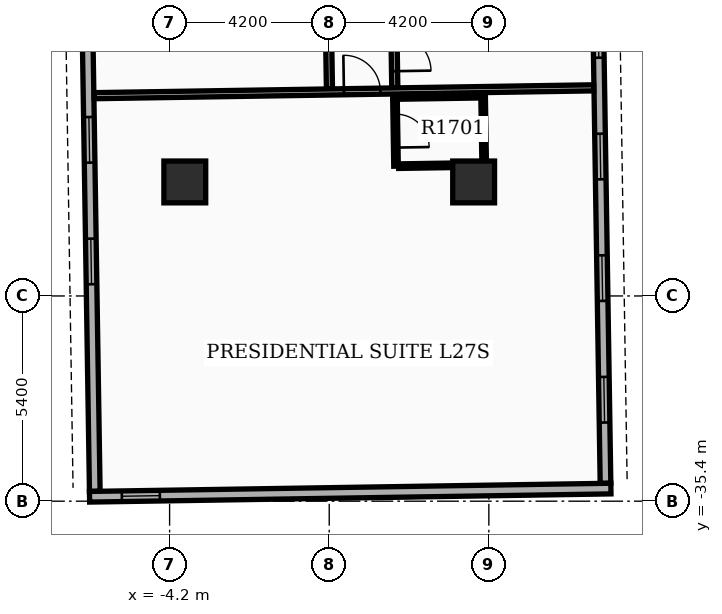
"""IFC4 building model, lengths in metres.
Left out: names, types, materials, properties, quantities, classifications, styles, units other than length and angle.
Written with IfcOpenShell. Run it as: python <this file> out.ifc"""

import sys

from ifc_helpers import new_model, si_unit, direction, frame, frame_2d, origin, origin_2d, place, context, subcontext, project, spatial, rectangle, extrude, element, fill, save


model = new_model("IFC4")
c1 = context("Model", 3, precision=1e-05, world=origin(), true_north=direction((0.0, 1.0)))
c2 = subcontext(c1, "Body", "Model", "MODEL_VIEW")
j1 = project(units=[si_unit("LENGTHUNIT", "METRE"), si_unit("PLANEANGLEUNIT", "RADIAN")], contexts=[c1])
p1 = place(None, origin())
s1 = spatial("IfcSite", under=j1, at=p1, CompositionType="ELEMENT")
p2 = place(p1, origin())
s2 = spatial("IfcBuilding", under=s1, at=p2, CompositionType="ELEMENT")
p3 = place(p2, frame((0.0, 0.0, 108.6)))
s3 = spatial("IfcBuildingStorey", under=s2, at=p3, CompositionType="ELEMENT", Elevation=108.6)
for number, where, z_axis, x_axis in (
    (1, (-3.8, -27.0, 0.0), (0.0, 0.0, 1.0), (1.0, 0.0, 0.0)),
    (2, (3.8, -27.0, 0.0), (0.0, 0.0, 1.0), (1.0, 0.0, 0.0)),
):
    element("IfcColumn", number, at=place(p3, frame(where, z_axis=z_axis, x_axis=x_axis)), inside=s3, PredefinedType="COLUMN", context=c2, shape_type="SweptSolid", body=[
        extrude(rectangle(XDim=1.1, YDim=1.1, at=origin_2d()), origin(), (0.0, 0.0, 1.0), 3.9),
    ])
p4 = place(p3, frame((-6.485, -15.044, 0.0), z_axis=(0.0, 0.0, 1.0), x_axis=(0.01571739401, -0.999876474133, 0.0)))
e3 = element("IfcWall", 3, at=p4, inside=s3, PredefinedType="STANDARD", context=c2, shape_type="SweptSolid", body=[
    extrude(rectangle(XDim=20.1, YDim=0.28, at=frame_2d((10.05, 0.0))), origin(), (0.0, 0.0, 1.0), 2.97),
])
p5 = place(p4, frame((1.6, 0.0, 0.8)))
e4 = element("IfcOpeningElement", 4, at=p5, cuts=e3, PredefinedType="OPENING", context=c2, shape_type="SweptSolid", body=[
    extrude(rectangle(XDim=1.2, YDim=1.6, at=frame_2d((0.6, 0.8))), frame((0.0, 0.15, 0.0), z_axis=(0.0, -1.0, 0.0), x_axis=(1.0, 0.0, 0.0)), (0.0, 0.0, 1.0), 0.3),
])
p6 = place(p4, frame((4.8, 0.0, 0.8)))
e5 = element("IfcOpeningElement", 5, at=p6, cuts=e3, PredefinedType="OPENING", context=c2, shape_type="SweptSolid", body=[
    extrude(rectangle(XDim=1.2, YDim=1.6, at=frame_2d((0.6, 0.8))), frame((0.0, 0.15, 0.0), z_axis=(0.0, -1.0, 0.0), x_axis=(1.0, 0.0, 0.0)), (0.0, 0.0, 1.0), 0.3),
])
p7 = place(p4, frame((10.25, 0.0, 0.8)))
e6 = element("IfcOpeningElement", 6, at=p7, cuts=e3, PredefinedType="OPENING", context=c2, shape_type="SweptSolid", body=[
    extrude(rectangle(XDim=1.2, YDim=1.6, at=frame_2d((0.6, 0.8))), frame((0.0, 0.15, 0.0), z_axis=(0.0, -1.0, 0.0), x_axis=(1.0, 0.0, 0.0)), (0.0, 0.0, 1.0), 0.3),
])
p8 = place(p4, frame((13.45, 0.0, 0.8)))
e7 = element("IfcOpeningElement", 7, at=p8, cuts=e3, PredefinedType="OPENING", context=c2, shape_type="SweptSolid", body=[
    extrude(rectangle(XDim=1.2, YDim=1.6, at=frame_2d((0.6, 0.8))), frame((0.0, 0.15, 0.0), z_axis=(0.0, -1.0, 0.0), x_axis=(1.0, 0.0, 0.0)), (0.0, 0.0, 1.0), 0.3),
])
p9 = place(p3, frame((7.27, -34.93, 0.0), z_axis=(0.0, 0.0, 1.0), x_axis=(-0.015705059908, 0.999876667941, 0.0)))
e8 = element("IfcWall", 8, at=p9, inside=s3, PredefinedType="STANDARD", context=c2, shape_type="SweptSolid", body=[
    extrude(rectangle(XDim=20.1, YDim=0.28, at=frame_2d((10.05, 0.0))), origin(), (0.0, 0.0, 1.0), 2.97),
])
p10 = place(p9, frame((1.6, 0.0, 0.8)))
e9 = element("IfcOpeningElement", 9, at=p10, cuts=e8, PredefinedType="OPENING", context=c2, shape_type="SweptSolid", body=[
    extrude(rectangle(XDim=1.2, YDim=1.6, at=frame_2d((0.6, 0.8))), frame((0.0, 0.15, 0.0), z_axis=(0.0, -1.0, 0.0), x_axis=(1.0, 0.0, 0.0)), (0.0, 0.0, 1.0), 0.3),
])
p11 = place(p9, frame((4.8, 0.0, 0.8)))
e10 = element("IfcOpeningElement", 10, at=p11, cuts=e8, PredefinedType="OPENING", context=c2, shape_type="SweptSolid", body=[
    extrude(rectangle(XDim=1.2, YDim=1.6, at=frame_2d((0.6, 0.8))), frame((0.0, 0.15, 0.0), z_axis=(0.0, -1.0, 0.0), x_axis=(1.0, 0.0, 0.0)), (0.0, 0.0, 1.0), 0.3),
])
p12 = place(p9, frame((8.0, 0.0, 0.8)))
e11 = element("IfcOpeningElement", 11, at=p12, cuts=e8, PredefinedType="OPENING", context=c2, shape_type="SweptSolid", body=[
    extrude(rectangle(XDim=1.2, YDim=1.6, at=frame_2d((0.6, 0.8))), frame((0.0, 0.15, 0.0), z_axis=(0.0, -1.0, 0.0), x_axis=(1.0, 0.0, 0.0)), (0.0, 0.0, 1.0), 0.3),
])
p13 = place(p9, frame((11.2, 0.0, 0.8)))
e12 = element("IfcOpeningElement", 12, at=p13, cuts=e8, PredefinedType="OPENING", context=c2, shape_type="SweptSolid", body=[
    extrude(rectangle(XDim=1.2, YDim=1.6, at=frame_2d((0.6, 0.8))), frame((0.0, 0.15, 0.0), z_axis=(0.0, -1.0, 0.0), x_axis=(1.0, 0.0, 0.0)), (0.0, 0.0, 1.0), 0.3),
])
p14 = place(p3, frame((-6.307, -35.283, 0.0), z_axis=(0.0, 0.0, 1.0), x_axis=(0.999876549481, 0.015712599986, 0.0)))
e13 = element("IfcWall", 13, at=p14, inside=s3, PredefinedType="STANDARD", context=c2, shape_type="SweptSolid", body=[
    extrude(rectangle(XDim=13.72, YDim=0.28, at=frame_2d((6.86, 0.0))), origin(), (0.0, 0.0, 1.0), 2.97),
])
p15 = place(p14, frame((0.85, 0.0, 0.85)))
e14 = element("IfcOpeningElement", 14, at=p15, cuts=e13, PredefinedType="OPENING", context=c2, shape_type="SweptSolid", body=[
    extrude(rectangle(XDim=1.0, YDim=1.5, at=frame_2d((0.5, 0.75))), frame((0.0, 0.15, 0.0), z_axis=(0.0, -1.0, 0.0), x_axis=(1.0, 0.0, 0.0)), (0.0, 0.0, 1.0), 0.3),
])
p16 = place(p3, frame((1.573, -14.827, 0.0), z_axis=(0.0, 0.0, 1.0), x_axis=(0.015705659641, -0.999876658521, 0.0)))
e15 = element("IfcWall", 15, at=p16, inside=s3, PredefinedType="PARTITIONING", context=c2, shape_type="SweptSolid", body=[
    extrude(rectangle(XDim=9.7, YDim=0.16, at=frame_2d((4.85, 0.0))), origin(), (0.0, 0.0, 1.0), 2.96),
])
p17 = place(p16, frame((8.3, 0.0, 0.0)))
e16 = element("IfcOpeningElement", 16, at=p17, cuts=e15, PredefinedType="OPENING", context=c2, shape_type="SweptSolid", body=[
    extrude(rectangle(XDim=0.96, YDim=2.15, at=frame_2d((0.48, 1.075))), frame((0.0, 0.09, 0.0), z_axis=(0.0, -1.0, 0.0), x_axis=(1.0, 0.0, 0.0)), (0.0, 0.0, 1.0), 0.18),
])
p18 = place(p3, frame((-0.147, -14.854, 0.0), z_axis=(0.0, 0.0, 1.0), x_axis=(0.015705264399, -0.999876664729, 0.0)))
e17 = element("IfcWall", 17, at=p18, inside=s3, PredefinedType="PARTITIONING", context=c2, shape_type="SweptSolid", body=[
    extrude(rectangle(XDim=9.7, YDim=0.16, at=frame_2d((4.85, 0.0))), origin(), (0.0, 0.0, 1.0), 2.96),
])
p19 = place(p18, frame((7.704, 0.0, 0.0)))
e18 = element("IfcOpeningElement", 18, at=p19, cuts=e17, PredefinedType="OPENING", context=c2, shape_type="SweptSolid", body=[
    extrude(rectangle(XDim=0.96, YDim=2.15, at=frame_2d((0.48, 1.075))), frame((0.0, 0.09, 0.0), z_axis=(0.0, -1.0, 0.0), x_axis=(1.0, 0.0, 0.0)), (0.0, 0.0, 1.0), 0.18),
])
p20 = place(p3, frame((-6.184, -24.73, 0.0), z_axis=(0.0, 0.0, 1.0), x_axis=(0.999876528878, 0.015713911007, 0.0)))
e19 = element("IfcWall", 19, at=p20, inside=s3, PredefinedType="PARTITIONING", context=c2, shape_type="SweptSolid", body=[
    extrude(rectangle(XDim=13.144, YDim=0.16, at=frame_2d((6.572, 0.0))), origin(), (0.0, 0.0, 1.0), 2.96),
])
p21 = place(p20, frame((6.572, 0.0, 0.0)))
e20 = element("IfcOpeningElement", 20, at=p21, cuts=e19, PredefinedType="OPENING", context=c2, shape_type="SweptSolid", body=[
    extrude(rectangle(XDim=0.96, YDim=2.15, at=frame_2d((0.48, 1.075))), frame((0.0, 0.09, 0.0), z_axis=(0.0, -1.0, 0.0), x_axis=(1.0, 0.0, 0.0)), (0.0, 0.0, 1.0), 0.18),
])
p22 = place(p3, frame((1.729, -24.766, 0.0), z_axis=(0.0, 0.0, 1.0), x_axis=(0.015694337248, -0.999876836305, 0.0)))
e21 = element("IfcWall", 21, at=p22, inside=s3, PredefinedType="PARTITIONING", context=c2, shape_type="SweptSolid", body=[
    extrude(rectangle(XDim=1.82, YDim=0.12, at=frame_2d((0.91, 0.0))), origin(), (0.0, 0.0, 1.0), 2.96),
])
p23 = place(p22, frame((0.45, 0.0, 0.0)))
e22 = element("IfcOpeningElement", 22, at=p23, cuts=e21, PredefinedType="OPENING", context=c2, shape_type="SweptSolid", body=[
    extrude(rectangle(XDim=0.88, YDim=2.1, at=frame_2d((0.44, 1.05))), frame((0.0, 0.07, 0.0), z_axis=(0.0, -1.0, 0.0), x_axis=(1.0, 0.0, 0.0)), (0.0, 0.0, 1.0), 0.14),
])
p24 = place(p3, frame((4.049, -24.729, 0.0), z_axis=(0.0, 0.0, 1.0), x_axis=(0.015694337248, -0.999876836305, 0.0)))
e23 = element("IfcWall", 23, at=p24, inside=s3, PredefinedType="PARTITIONING", context=c2, shape_type="SweptSolid", body=[
    extrude(rectangle(XDim=1.82, YDim=0.12, at=frame_2d((0.91, 0.0))), origin(), (0.0, 0.0, 1.0), 2.96),
])
for number, where, z_axis, x_axis in (
    (24, (1.799, -24.765, 0.0), (0.0, 0.0, 1.0), (1.0, 0.016, 0.0)),
    (25, (1.828, -26.585, 0.0), (0.0, 0.0, 1.0), (1.0, 0.016, 0.0)),
):
    element("IfcWall", number, at=place(p3, frame(where, z_axis=z_axis, x_axis=x_axis)), inside=s3, PredefinedType="PARTITIONING", context=c2, shape_type="SweptSolid", body=[
        extrude(rectangle(XDim=2.18, YDim=0.12, at=frame_2d((1.09, 0.0))), origin(), (0.0, 0.0, 1.0), 2.96),
    ])
p25 = place(p7, origin())
e26 = element("IfcWindow", 26, at=p25, inside=s3, PartitioningType="SINGLE_PANEL", PredefinedType="WINDOW", context=c2, shape_type="SweptSolid", body=[
    extrude(rectangle(XDim=1.2, YDim=1.6, at=frame_2d((0.6, 0.8))), frame((0.0, 0.03, 0.0), z_axis=(0.0, -1.0, 0.0), x_axis=(1.0, 0.0, 0.0)), (0.0, 0.0, 1.0), 0.06),
])
fill(e6, e26)
p26 = place(p8, origin())
e27 = element("IfcWindow", 27, at=p26, inside=s3, PartitioningType="SINGLE_PANEL", PredefinedType="WINDOW", context=c2, shape_type="SweptSolid", body=[
    extrude(rectangle(XDim=1.2, YDim=1.6, at=frame_2d((0.6, 0.8))), frame((0.0, 0.03, 0.0), z_axis=(0.0, -1.0, 0.0), x_axis=(1.0, 0.0, 0.0)), (0.0, 0.0, 1.0), 0.06),
])
fill(e7, e27)
p27 = place(p10, origin())
e28 = element("IfcWindow", 28, at=p27, inside=s3, PartitioningType="SINGLE_PANEL", PredefinedType="WINDOW", context=c2, shape_type="SweptSolid", body=[
    extrude(rectangle(XDim=1.2, YDim=1.6, at=frame_2d((0.6, 0.8))), frame((0.0, 0.03, 0.0), z_axis=(0.0, -1.0, 0.0), x_axis=(1.0, 0.0, 0.0)), (0.0, 0.0, 1.0), 0.06),
])
fill(e9, e28)
p28 = place(p11, origin())
e29 = element("IfcWindow", 29, at=p28, inside=s3, PartitioningType="SINGLE_PANEL", PredefinedType="WINDOW", context=c2, shape_type="SweptSolid", body=[
    extrude(rectangle(XDim=1.2, YDim=1.6, at=frame_2d((0.6, 0.8))), frame((0.0, 0.03, 0.0), z_axis=(0.0, -1.0, 0.0), x_axis=(1.0, 0.0, 0.0)), (0.0, 0.0, 1.0), 0.06),
])
fill(e10, e29)
p29 = place(p12, origin())
e30 = element("IfcWindow", 30, at=p29, inside=s3, PartitioningType="SINGLE_PANEL", PredefinedType="WINDOW", context=c2, shape_type="SweptSolid", body=[
    extrude(rectangle(XDim=1.2, YDim=1.6, at=frame_2d((0.6, 0.8))), frame((0.0, 0.03, 0.0), z_axis=(0.0, -1.0, 0.0), x_axis=(1.0, 0.0, 0.0)), (0.0, 0.0, 1.0), 0.06),
])
fill(e11, e30)
p30 = place(p13, origin())
e31 = element("IfcWindow", 31, at=p30, inside=s3, PartitioningType="SINGLE_PANEL", PredefinedType="WINDOW", context=c2, shape_type="SweptSolid", body=[
    extrude(rectangle(XDim=1.2, YDim=1.6, at=frame_2d((0.6, 0.8))), frame((0.0, 0.03, 0.0), z_axis=(0.0, -1.0, 0.0), x_axis=(1.0, 0.0, 0.0)), (0.0, 0.0, 1.0), 0.06),
])
fill(e12, e31)
p31 = place(p15, origin())
e32 = element("IfcWindow", 32, at=p31, inside=s3, PartitioningType="SINGLE_PANEL", PredefinedType="WINDOW", context=c2, shape_type="SweptSolid", body=[
    extrude(rectangle(XDim=1.0, YDim=1.5, at=frame_2d((0.5, 0.75))), frame((0.0, 0.03, 0.0), z_axis=(0.0, -1.0, 0.0), x_axis=(1.0, 0.0, 0.0)), (0.0, 0.0, 1.0), 0.06),
])
fill(e14, e32)
p32 = place(p17, origin())
e33 = element("IfcDoor", 33, at=p32, inside=s3, OperationType="SINGLE_SWING_RIGHT", PredefinedType="DOOR", context=c2, shape_type="SweptSolid", body=[
    extrude(rectangle(XDim=0.96, YDim=2.15, at=frame_2d((0.48, 1.075))), frame((0.0, 0.025, 0.0), z_axis=(0.0, -1.0, 0.0), x_axis=(1.0, 0.0, 0.0)), (0.0, 0.0, 1.0), 0.05),
])
fill(e16, e33)
p33 = place(p21, origin())
e34 = element("IfcDoor", 34, at=p33, inside=s3, OperationType="SINGLE_SWING_LEFT", PredefinedType="DOOR", context=c2, shape_type="SweptSolid", body=[
    extrude(rectangle(XDim=0.96, YDim=2.15, at=frame_2d((0.48, 1.075))), frame((0.0, 0.025, 0.0), z_axis=(0.0, -1.0, 0.0), x_axis=(1.0, 0.0, 0.0)), (0.0, 0.0, 1.0), 0.05),
])
fill(e20, e34)
p34 = place(p23, origin())
e35 = element("IfcDoor", 35, at=p34, inside=s3, OperationType="SINGLE_SWING_RIGHT", PredefinedType="DOOR", context=c2, shape_type="SweptSolid", body=[
    extrude(rectangle(XDim=0.88, YDim=2.1, at=frame_2d((0.44, 1.05))), frame((0.0, 0.025, 0.0), z_axis=(0.0, -1.0, 0.0), x_axis=(1.0, 0.0, 0.0)), (0.0, 0.0, 1.0), 0.05),
])
fill(e22, e35)
save(model, sys.argv[1])
